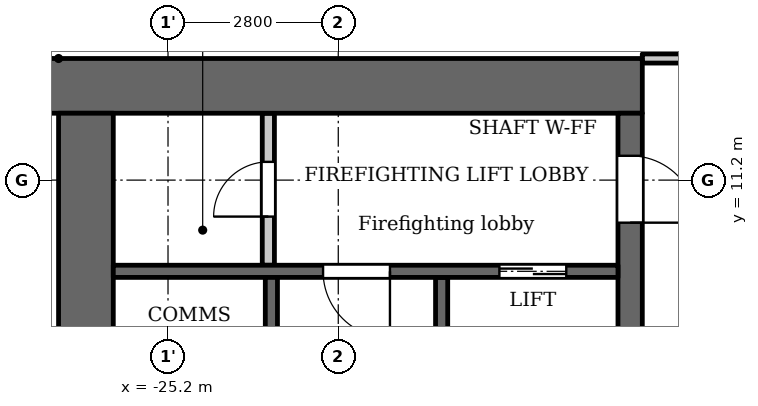
"""IFC4 building model, lengths in metres.
Left out: names, types, materials, properties, quantities, classifications, styles, units other than length and angle.
Written with IfcOpenShell. Run it as: python <this file> out.ifc"""

import sys

from ifc_helpers import new_model, si_unit, direction, frame, frame_2d, origin, place, context, subcontext, project, spatial, rectangle, extrude, element, fill, save


model = new_model("IFC4")
c1 = context("Model", 3, precision=1e-05, world=origin(), true_north=direction((0.0, 1.0)))
c2 = subcontext(c1, "Body", "Model", "MODEL_VIEW")
j1 = project(units=[si_unit("LENGTHUNIT", "METRE"), si_unit("PLANEANGLEUNIT", "RADIAN")], contexts=[c1])
p1 = place(None, origin())
s1 = spatial("IfcSite", under=j1, at=p1, CompositionType="ELEMENT")
p2 = place(p1, origin())
s2 = spatial("IfcBuilding", under=s1, at=p2, CompositionType="ELEMENT")
p3 = place(p2, frame((0.0, 0.0, 41.0)))
s3 = spatial("IfcBuildingStorey", under=s2, at=p3, CompositionType="ELEMENT", Elevation=41.0)
p4 = place(p3, frame((-20.7, 2.6, 0.0), z_axis=(0.0, 0.0, 1.0), x_axis=(0.0, 1.0, 0.0)))
e1 = element("IfcWall", 1, at=p4, inside=s3, PredefinedType="SHEAR", context=c2, shape_type="SweptSolid", body=[
    extrude(rectangle(XDim=7.0, YDim=0.2, at=frame_2d((3.5, 0.0))), origin(), (0.0, 0.0, 1.0), 3.2),
])
p5 = place(p3, frame((-17.4, 12.75, 0.0), z_axis=(0.0, 0.0, 1.0), x_axis=(-1.0, 0.0, 0.0)))
e2 = element("IfcWall", 2, at=p5, inside=s3, PredefinedType="SHEAR", context=c2, shape_type="SweptSolid", body=[
    extrude(rectangle(XDim=10.4, YDim=0.9, at=frame_2d((5.2, 0.0))), origin(), (0.0, 0.0, 1.0), 3.2),
])
p6 = place(p3, frame((-17.6, -12.3, 0.0), z_axis=(0.0, 0.0, 1.0), x_axis=(0.0, 1.0, 0.0)))
e3 = element("IfcWall", 3, at=p6, inside=s3, PredefinedType="SHEAR", context=c2, shape_type="SweptSolid", body=[
    extrude(rectangle(XDim=24.6, YDim=0.4, at=frame_2d((12.3, 0.0))), origin(), (0.0, 0.0, 1.0), 3.2),
])
p7 = place(p6, frame((6.0, 0.0, 0.0)))
e4 = element("IfcOpeningElement", 4, at=p7, cuts=e3, PredefinedType="OPENING", context=c2, shape_type="SweptSolid", body=[
    extrude(rectangle(XDim=1.1, YDim=2.1, at=frame_2d((0.55, 1.05))), frame((0.0, 0.21, 0.0), z_axis=(0.0, -1.0, 0.0), x_axis=(1.0, 0.0, 0.0)), (0.0, 0.0, 1.0), 0.42),
])
p8 = place(p6, frame((8.4, 0.0, 0.0)))
e5 = element("IfcOpeningElement", 5, at=p8, cuts=e3, PredefinedType="OPENING", context=c2, shape_type="SweptSolid", body=[
    extrude(rectangle(XDim=1.1, YDim=2.1, at=frame_2d((0.55, 1.05))), frame((0.0, 0.21, 0.0), z_axis=(0.0, -1.0, 0.0), x_axis=(1.0, 0.0, 0.0)), (0.0, 0.0, 1.0), 0.42),
])
p9 = place(p6, frame((10.8, 0.0, 0.0)))
e6 = element("IfcOpeningElement", 6, at=p9, cuts=e3, PredefinedType="OPENING", context=c2, shape_type="SweptSolid", body=[
    extrude(rectangle(XDim=1.1, YDim=2.1, at=frame_2d((0.55, 1.05))), frame((0.0, 0.21, 0.0), z_axis=(0.0, -1.0, 0.0), x_axis=(1.0, 0.0, 0.0)), (0.0, 0.0, 1.0), 0.42),
])
p10 = place(p6, frame((16.75, 0.0, 0.0)))
e7 = element("IfcOpeningElement", 7, at=p10, cuts=e3, PredefinedType="OPENING", context=c2, shape_type="SweptSolid", body=[
    extrude(rectangle(XDim=0.9, YDim=2.1, at=frame_2d((0.45, 1.05))), frame((0.0, 0.21, 0.0), z_axis=(0.0, -1.0, 0.0), x_axis=(1.0, 0.0, 0.0)), (0.0, 0.0, 1.0), 0.42),
])
p11 = place(p6, frame((22.8, 0.0, 0.0)))
e8 = element("IfcOpeningElement", 8, at=p11, cuts=e3, PredefinedType="OPENING", context=c2, shape_type="SweptSolid", body=[
    extrude(rectangle(XDim=1.1, YDim=2.1, at=frame_2d((0.55, 1.05))), frame((0.0, 0.21, 0.0), z_axis=(0.0, -1.0, 0.0), x_axis=(1.0, 0.0, 0.0)), (0.0, 0.0, 1.0), 0.42),
])
p12 = place(p6, frame((0.7, 0.0, 0.0)))
e9 = element("IfcOpeningElement", 9, at=p12, cuts=e3, PredefinedType="OPENING", context=c2, shape_type="SweptSolid", body=[
    extrude(rectangle(XDim=1.1, YDim=2.1, at=frame_2d((0.55, 1.05))), frame((0.0, 0.21, 0.0), z_axis=(0.0, -1.0, 0.0), x_axis=(1.0, 0.0, 0.0)), (0.0, 0.0, 1.0), 0.42),
])
p13 = place(p6, frame((12.775, 0.0, 0.0)))
e10 = element("IfcOpeningElement", 10, at=p13, cuts=e3, PredefinedType="OPENING", context=c2, shape_type="SweptSolid", body=[
    extrude(rectangle(XDim=1.8, YDim=2.1, at=frame_2d((0.9, 1.05))), frame((0.0, 0.21, 0.0), z_axis=(0.0, -1.0, 0.0), x_axis=(1.0, 0.0, 0.0)), (0.0, 0.0, 1.0), 0.42),
])
p14 = place(p3, frame((-26.55, -12.3, 0.0), z_axis=(0.0, 0.0, 1.0), x_axis=(0.0, 1.0, 0.0)))
e11 = element("IfcWall", 11, at=p14, inside=s3, PredefinedType="SHEAR", context=c2, shape_type="SweptSolid", body=[
    extrude(rectangle(XDim=24.6, YDim=0.9, at=frame_2d((12.3, 0.0))), origin(), (0.0, 0.0, 1.0), 3.2),
])
p15 = place(p3, frame((-23.55, 9.8, 0.0), z_axis=(0.0, 0.0, 1.0), x_axis=(0.0, 1.0, 0.0)))
e12 = element("IfcWall", 12, at=p15, inside=s3, PredefinedType="PARTITIONING", context=c2, shape_type="SweptSolid", body=[
    extrude(rectangle(XDim=2.5, YDim=0.2, at=frame_2d((1.25, 0.0))), origin(), (0.0, 0.0, 1.0), 3.2),
])
p16 = place(p15, frame((0.8, 0.0, 0.0)))
e13 = element("IfcOpeningElement", 13, at=p16, cuts=e12, PredefinedType="OPENING", context=c2, shape_type="SweptSolid", body=[
    extrude(rectangle(XDim=0.9, YDim=2.1, at=frame_2d((0.45, 1.05))), frame((0.0, 0.11, 0.0), z_axis=(0.0, -1.0, 0.0), x_axis=(1.0, 0.0, 0.0)), (0.0, 0.0, 1.0), 0.22),
])
p17 = place(p3, frame((-17.8, 9.7, 0.0), z_axis=(0.0, 0.0, 1.0), x_axis=(-1.0, 0.0, 0.0)))
e14 = element("IfcWall", 14, at=p17, inside=s3, PredefinedType="SHEAR", context=c2, shape_type="SweptSolid", body=[
    extrude(rectangle(XDim=8.3, YDim=0.2, at=frame_2d((4.15, 0.0))), origin(), (0.0, 0.0, 1.0), 3.2),
])
p18 = place(p17, frame((0.85, 0.0, 0.0)))
e15 = element("IfcOpeningElement", 15, at=p18, cuts=e14, PredefinedType="OPENING", context=c2, shape_type="SweptSolid", body=[
    extrude(rectangle(XDim=1.1, YDim=2.1, at=frame_2d((0.55, 1.05))), frame((0.0, 0.11, 0.0), z_axis=(0.0, -1.0, 0.0), x_axis=(1.0, 0.0, 0.0)), (0.0, 0.0, 1.0), 0.22),
])
p19 = place(p17, frame((3.75, 0.0, 0.0)))
e16 = element("IfcOpeningElement", 16, at=p19, cuts=e14, PredefinedType="OPENING", context=c2, shape_type="SweptSolid", body=[
    extrude(rectangle(XDim=1.1, YDim=2.1, at=frame_2d((0.55, 1.05))), frame((0.0, 0.11, 0.0), z_axis=(0.0, -1.0, 0.0), x_axis=(1.0, 0.0, 0.0)), (0.0, 0.0, 1.0), 0.22),
])
p20 = place(p3, frame((-23.5, 2.6, 0.0), z_axis=(0.0, 0.0, 1.0), x_axis=(0.0, 1.0, 0.0)))
e17 = element("IfcWall", 17, at=p20, inside=s3, PredefinedType="SHEAR", context=c2, shape_type="SweptSolid", body=[
    extrude(rectangle(XDim=7.0, YDim=0.2, at=frame_2d((3.5, 0.0))), origin(), (0.0, 0.0, 1.0), 3.2),
])
p21 = place(p3, frame((-17.4, 13.2, 0.0), z_axis=(0.0, 0.0, 1.0), x_axis=(1.0, 0.0, 0.0)))
e18 = element("IfcWall", 18, at=p21, inside=s3, PredefinedType="PARTITIONING", context=c2, shape_type="SweptSolid", body=[
    extrude(rectangle(XDim=34.8, YDim=0.15, at=frame_2d((17.4, 0.0))), origin(), (0.0, 0.0, 1.0), 3.2),
])
p22 = place(p21, frame((0.75, 0.0, 0.0)))
e19 = element("IfcOpeningElement", 19, at=p22, cuts=e18, PredefinedType="OPENING", context=c2, shape_type="SweptSolid", body=[
    extrude(rectangle(XDim=1.0, YDim=2.1, at=frame_2d((0.5, 1.05))), frame((0.0, 0.085, 0.0), z_axis=(0.0, -1.0, 0.0), x_axis=(1.0, 0.0, 0.0)), (0.0, 0.0, 1.0), 0.17),
])
p23 = place(p21, frame((33.15, 0.0, 0.0)))
e20 = element("IfcOpeningElement", 20, at=p23, cuts=e18, PredefinedType="OPENING", context=c2, shape_type="SweptSolid", body=[
    extrude(rectangle(XDim=1.0, YDim=2.1, at=frame_2d((0.5, 1.05))), frame((0.0, 0.085, 0.0), z_axis=(0.0, -1.0, 0.0), x_axis=(1.0, 0.0, 0.0)), (0.0, 0.0, 1.0), 0.17),
])
p24 = place(p21, frame((3.05, 0.0, 0.0)))
e21 = element("IfcOpeningElement", 21, at=p24, cuts=e18, PredefinedType="OPENING", context=c2, shape_type="SweptSolid", body=[
    extrude(rectangle(XDim=1.0, YDim=2.1, at=frame_2d((0.5, 1.05))), frame((0.0, 0.085, 0.0), z_axis=(0.0, -1.0, 0.0), x_axis=(1.0, 0.0, 0.0)), (0.0, 0.0, 1.0), 0.17),
])
p25 = place(p21, frame((12.45, 0.0, 0.0)))
e22 = element("IfcOpeningElement", 22, at=p25, cuts=e18, PredefinedType="OPENING", context=c2, shape_type="SweptSolid", body=[
    extrude(rectangle(XDim=1.0, YDim=2.1, at=frame_2d((0.5, 1.05))), frame((0.0, 0.085, 0.0), z_axis=(0.0, -1.0, 0.0), x_axis=(1.0, 0.0, 0.0)), (0.0, 0.0, 1.0), 0.17),
])
p26 = place(p21, frame((18.3, 0.0, 0.0)))
e23 = element("IfcOpeningElement", 23, at=p26, cuts=e18, PredefinedType="OPENING", context=c2, shape_type="SweptSolid", body=[
    extrude(rectangle(XDim=1.0, YDim=2.1, at=frame_2d((0.5, 1.05))), frame((0.0, 0.085, 0.0), z_axis=(0.0, -1.0, 0.0), x_axis=(1.0, 0.0, 0.0)), (0.0, 0.0, 1.0), 0.17),
])
p27 = place(p21, frame((29.25, 0.0, 0.0)))
e24 = element("IfcOpeningElement", 24, at=p27, cuts=e18, PredefinedType="OPENING", context=c2, shape_type="SweptSolid", body=[
    extrude(rectangle(XDim=1.0, YDim=2.1, at=frame_2d((0.5, 1.05))), frame((0.0, 0.085, 0.0), z_axis=(0.0, -1.0, 0.0), x_axis=(1.0, 0.0, 0.0)), (0.0, 0.0, 1.0), 0.17),
])
p28 = place(p18, origin())
e25 = element("IfcDoor", 25, at=p28, inside=s3, OperationType="DOUBLE_DOOR_SLIDING", PredefinedType="DOOR", context=c2, shape_type="SweptSolid", body=[
    extrude(rectangle(XDim=1.1, YDim=2.1, at=frame_2d((0.55, 1.05))), frame((0.0, 0.025, 0.0), z_axis=(0.0, -1.0, 0.0), x_axis=(1.0, 0.0, 0.0)), (0.0, 0.0, 1.0), 0.05),
])
fill(e15, e25)
p29 = place(p11, origin())
e26 = element("IfcDoor", 26, at=p29, inside=s3, OperationType="SINGLE_SWING_LEFT", PredefinedType="DOOR", context=c2, shape_type="SweptSolid", body=[
    extrude(rectangle(XDim=1.1, YDim=2.1, at=frame_2d((0.55, 1.05))), frame((0.0, 0.025, 0.0), z_axis=(0.0, -1.0, 0.0), x_axis=(1.0, 0.0, 0.0)), (0.0, 0.0, 1.0), 0.05),
])
fill(e8, e26)
p30 = place(p16, origin())
e27 = element("IfcDoor", 27, at=p30, inside=s3, OperationType="SINGLE_SWING_RIGHT", PredefinedType="DOOR", context=c2, shape_type="SweptSolid", body=[
    extrude(rectangle(XDim=0.9, YDim=2.1, at=frame_2d((0.45, 1.05))), frame((0.0, 0.025, 0.0), z_axis=(0.0, -1.0, 0.0), x_axis=(1.0, 0.0, 0.0)), (0.0, 0.0, 1.0), 0.05),
])
fill(e13, e27)
p31 = place(p19, origin())
e28 = element("IfcDoor", 28, at=p31, inside=s3, OperationType="SINGLE_SWING_RIGHT", PredefinedType="DOOR", context=c2, shape_type="SweptSolid", body=[
    extrude(rectangle(XDim=1.1, YDim=2.1, at=frame_2d((0.55, 1.05))), frame((0.0, 0.025, 0.0), z_axis=(0.0, -1.0, 0.0), x_axis=(1.0, 0.0, 0.0)), (0.0, 0.0, 1.0), 0.05),
])
fill(e16, e28)
save(model, sys.argv[1])
